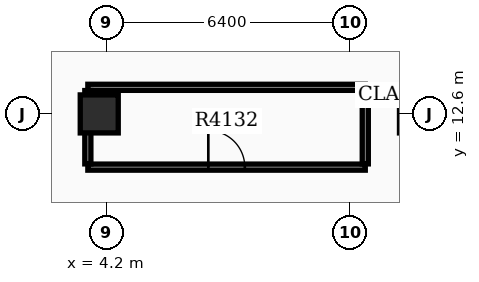
"""IFC4 building model, lengths in metres.
Left out: names, types, materials, properties, quantities, classifications, styles, units other than length and angle.
Written with IfcOpenShell. Run it as: python <this file> out.ifc"""

import sys

from ifc_helpers import new_model, si_unit, direction, frame, frame_2d, origin, origin_2d, place, context, subcontext, project, spatial, rectangle, extrude, element, fill, save


model = new_model("IFC4")
c1 = context("Model", 3, precision=1e-05, world=origin(), true_north=direction((0.0, 1.0)))
c2 = subcontext(c1, "Body", "Model", "MODEL_VIEW")
j1 = project(units=[si_unit("LENGTHUNIT", "METRE"), si_unit("PLANEANGLEUNIT", "RADIAN")], contexts=[c1])
p1 = place(None, origin())
s1 = spatial("IfcSite", under=j1, at=p1, CompositionType="ELEMENT")
p2 = place(p1, origin())
s2 = spatial("IfcBuilding", under=s1, at=p2, CompositionType="ELEMENT")
p3 = place(p2, frame((0.0, 0.0, 261.6)))
s3 = spatial("IfcBuildingStorey", under=s2, at=p3, CompositionType="ELEMENT", Elevation=261.6)
for number, where, z_axis, x_axis in (
    (1, (12.4, 12.6, 0.0), (0.0, 0.0, 1.0), (1.0, 0.0, 0.0)),
    (2, (4.0, 12.6, 0.0), (0.0, 0.0, 1.0), (1.0, 0.0, 0.0)),
):
    element("IfcColumn", number, at=place(p3, frame(where, z_axis=z_axis, x_axis=x_axis)), inside=s3, PredefinedType="COLUMN", context=c2, shape_type="SweptSolid", body=[
        extrude(rectangle(XDim=1.0, YDim=1.0, at=origin_2d()), origin(), (0.0, 0.0, 1.0), 3.9),
    ])
p4 = place(p3, frame((3.7, 11.2, 0.0), z_axis=(0.0, 0.0, 1.0), x_axis=(1.0, 0.0, 0.0)))
e3 = element("IfcWall", 3, at=p4, inside=s3, PredefinedType="PARTITIONING", context=c2, shape_type="SweptSolid", body=[
    extrude(rectangle(XDim=7.3, YDim=0.16, at=frame_2d((3.65, 0.0))), origin(), (0.0, 0.0, 1.0), 3.17),
])
p5 = place(p4, frame((3.17, 0.0, 0.0)))
e4 = element("IfcOpeningElement", 4, at=p5, cuts=e3, PredefinedType="OPENING", context=c2, shape_type="SweptSolid", body=[
    extrude(rectangle(XDim=0.96, YDim=2.15, at=frame_2d((0.48, 1.075))), frame((0.0, 0.09, 0.0), z_axis=(0.0, -1.0, 0.0), x_axis=(1.0, 0.0, 0.0)), (0.0, 0.0, 1.0), 0.18),
])
p6 = place(p3, frame((3.7, 13.3, 0.0), z_axis=(0.0, 0.0, 1.0), x_axis=(1.0, 0.0, 0.0)))
e5 = element("IfcWall", 5, at=p6, inside=s3, PredefinedType="PARTITIONING", context=c2, shape_type="SweptSolid", body=[
    extrude(rectangle(XDim=7.3, YDim=0.16, at=frame_2d((3.65, 0.0))), origin(), (0.0, 0.0, 1.0), 3.17),
])
for number, where, z_axis, x_axis in (
    (6, (3.7, 11.285, 0.0), (0.0, 0.0, 1.0), (0.0, 1.0, 0.0)),
    (7, (11.0, 11.285, 0.0), (0.0, 0.0, 1.0), (0.0, 1.0, 0.0)),
):
    element("IfcWall", number, at=place(p3, frame(where, z_axis=z_axis, x_axis=x_axis)), inside=s3, PredefinedType="PARTITIONING", context=c2, shape_type="SweptSolid", body=[
        extrude(rectangle(XDim=1.93, YDim=0.16, at=frame_2d((0.965, 0.0))), origin(), (0.0, 0.0, 1.0), 3.17),
    ])
p7 = place(p5, origin())
e8 = element("IfcDoor", 8, at=p7, inside=s3, OperationType="SINGLE_SWING_LEFT", PredefinedType="DOOR", context=c2, shape_type="SweptSolid", body=[
    extrude(rectangle(XDim=0.96, YDim=2.15, at=frame_2d((0.48, 1.075))), frame((0.0, 0.025, 0.0), z_axis=(0.0, -1.0, 0.0), x_axis=(1.0, 0.0, 0.0)), (0.0, 0.0, 1.0), 0.05),
])
fill(e4, e8)
save(model, sys.argv[1])
